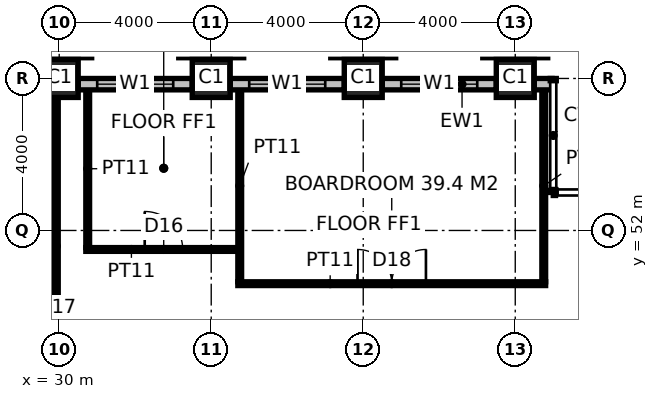
"""IFC4 building model, lengths in metres.
Left out: names, types, materials, properties, quantities, classifications, styles, units other than length and angle.
Written with IfcOpenShell. Run it as: python <this file> out.ifc"""

import sys

from ifc_helpers import new_model, si_unit, direction, frame, frame_2d, origin, origin_2d, place, context, subcontext, project, spatial, rectangle, hollow_rectangle, extrude, element, fill, save


model = new_model("IFC4")
c1 = context("Model", 3, precision=1e-05, world=origin(), true_north=direction((0.0, 1.0)))
c2 = subcontext(c1, "Body", "Model", "MODEL_VIEW")
j1 = project(units=[si_unit("LENGTHUNIT", "METRE"), si_unit("PLANEANGLEUNIT", "RADIAN")], contexts=[c1])
p1 = place(None, origin())
s1 = spatial("IfcSite", under=j1, at=p1, CompositionType="ELEMENT")
p2 = place(p1, origin())
s2 = spatial("IfcBuilding", under=s1, at=p2, CompositionType="ELEMENT")
p3 = place(p2, frame((0.0, 0.0, 187.8)))
s3 = spatial("IfcBuildingStorey", under=s2, at=p3, CompositionType="ELEMENT", Elevation=187.8)
for number, where, z_axis, x_axis in (
    (1, (30.0, 56.0, 0.0), (0.0, 0.0, 1.0), (1.0, 0.0, 0.0)),
    (2, (34.0, 56.0, 0.0), (0.0, 0.0, 1.0), (1.0, 0.0, 0.0)),
    (3, (38.0, 56.0, 0.0), (0.0, 0.0, 1.0), (1.0, 0.0, 0.0)),
    (4, (42.0, 56.0, 0.0), (0.0, 0.0, 1.0), (1.0, 0.0, 0.0)),
):
    element("IfcColumn", number, at=place(p3, frame(where, z_axis=z_axis, x_axis=x_axis)), inside=s3, PredefinedType="COLUMN", context=c2, shape_type="SweptSolid", body=[
        extrude(hollow_rectangle(XDim=1.0, YDim=1.0, WallThickness=0.1, at=origin_2d()), origin(), (0.0, 0.0, 1.0), 4.0),
    ])
p4 = place(p3, frame((34.7, 50.6, 0.0), z_axis=(0.0, 0.0, 1.0), x_axis=(1.0, 0.0, 0.0)))
e5 = element("IfcWall", 5, at=p4, inside=s3, PredefinedType="PARTITIONING", context=c2, shape_type="SweptSolid", body=[
    extrude(rectangle(XDim=8.1, YDim=0.1, at=frame_2d((4.05, 0.0))), origin(), (0.0, 0.0, 1.0), 3.85),
])
p5 = place(p4, frame((3.15, 0.0, 0.0)))
e6 = element("IfcOpeningElement", 6, at=p5, cuts=e5, PredefinedType="OPENING", context=c2, shape_type="SweptSolid", body=[
    extrude(rectangle(XDim=1.8, YDim=2.4, at=frame_2d((0.9, 1.2))), frame((0.0, 0.06, 0.0), z_axis=(0.0, -1.0, 0.0), x_axis=(1.0, 0.0, 0.0)), (0.0, 0.0, 1.0), 0.12),
])
p6 = place(p3, frame((30.7, 51.5, 0.0), z_axis=(0.0, 0.0, 1.0), x_axis=(1.0, 0.0, 0.0)))
e7 = element("IfcWall", 7, at=p6, inside=s3, PredefinedType="PARTITIONING", context=c2, shape_type="SweptSolid", body=[
    extrude(rectangle(XDim=4.0, YDim=0.1, at=frame_2d((2.0, 0.0))), origin(), (0.0, 0.0, 1.0), 3.85),
])
p7 = place(p6, frame((1.55, 0.0, 0.0)))
e8 = element("IfcOpeningElement", 8, at=p7, cuts=e7, PredefinedType="OPENING", context=c2, shape_type="SweptSolid", body=[
    extrude(rectangle(XDim=1.0, YDim=2.2, at=frame_2d((0.5, 1.1))), frame((0.0, 0.06, 0.0), z_axis=(0.0, -1.0, 0.0), x_axis=(1.0, 0.0, 0.0)), (0.0, 0.0, 1.0), 0.12),
])
p8 = place(p3, frame((30.75, 51.55, 0.0), z_axis=(0.0, 0.0, 1.0), x_axis=(0.0, 1.0, 0.0)))
e9 = element("IfcWall", 9, at=p8, inside=s3, PredefinedType="PARTITIONING", context=c2, shape_type="SweptSolid", body=[
    extrude(rectangle(XDim=4.15, YDim=0.1, at=frame_2d((2.075, 0.0))), origin(), (0.0, 0.0, 1.0), 3.85),
])
for number, where, z_axis, x_axis in (
    (10, (34.75, 50.65, 0.0), (0.0, 0.0, 1.0), (0.0, 1.0, 0.0)),
    (11, (42.75, 50.65, 0.0), (0.0, 0.0, 1.0), (0.0, 1.0, 0.0)),
):
    element("IfcWall", number, at=place(p3, frame(where, z_axis=z_axis, x_axis=x_axis)), inside=s3, PredefinedType="PARTITIONING", context=c2, shape_type="SweptSolid", body=[
        extrude(rectangle(XDim=5.05, YDim=0.1, at=frame_2d((2.525, 0.0))), origin(), (0.0, 0.0, 1.0), 3.85),
    ])
p9 = place(p3, frame((29.925, 55.7, 0.0), z_axis=(0.0, 0.0, 1.0), x_axis=(0.0, -1.0, 0.0)))
e12 = element("IfcWall", 12, at=p9, inside=s3, PredefinedType="PARTITIONING", context=c2, shape_type="SweptSolid", body=[
    extrude(rectangle(XDim=13.7, YDim=0.1, at=frame_2d((6.85, 0.0))), origin(), (0.0, 0.0, 1.0), 2.95),
])
p10 = place(p9, frame((6.35, 0.0, 0.0)))
e13 = element("IfcOpeningElement", 13, at=p10, cuts=e12, PredefinedType="OPENING", context=c2, shape_type="SweptSolid", body=[
    extrude(rectangle(XDim=1.0, YDim=2.2, at=frame_2d((0.5, 1.1))), frame((0.0, 0.06, 0.0), z_axis=(0.0, -1.0, 0.0), x_axis=(1.0, 0.0, 0.0)), (0.0, 0.0, 1.0), 0.12),
])
p11 = place(p3, frame((33.5, 55.85, 0.0), z_axis=(0.0, 0.0, 1.0), x_axis=(-1.0, 0.0, 0.0)))
e14 = element("IfcWall", 14, at=p11, inside=s3, PredefinedType="ELEMENTEDWALL", context=c2, shape_type="SweptSolid", body=[
    extrude(rectangle(XDim=3.0, YDim=0.3, at=frame_2d((1.5, 0.0))), origin(), (0.0, 0.0, 1.0), 2.85),
])
p12 = place(p11, frame((0.5, 0.0, 0.8)))
e15 = element("IfcOpeningElement", 15, at=p12, cuts=e14, PredefinedType="OPENING", context=c2, shape_type="SweptSolid", body=[
    extrude(rectangle(XDim=2.0, YDim=2.0, at=frame_2d((1.0, 1.0))), frame((0.0, 0.16, 0.0), z_axis=(0.0, -1.0, 0.0), x_axis=(1.0, 0.0, 0.0)), (0.0, 0.0, 1.0), 0.32),
])
p13 = place(p3, frame((37.5, 55.85, 0.0), z_axis=(0.0, 0.0, 1.0), x_axis=(-1.0, 0.0, 0.0)))
e16 = element("IfcWall", 16, at=p13, inside=s3, PredefinedType="ELEMENTEDWALL", context=c2, shape_type="SweptSolid", body=[
    extrude(rectangle(XDim=3.0, YDim=0.3, at=frame_2d((1.5, 0.0))), origin(), (0.0, 0.0, 1.0), 2.85),
])
p14 = place(p13, frame((0.5, 0.0, 0.8)))
e17 = element("IfcOpeningElement", 17, at=p14, cuts=e16, PredefinedType="OPENING", context=c2, shape_type="SweptSolid", body=[
    extrude(rectangle(XDim=2.0, YDim=2.0, at=frame_2d((1.0, 1.0))), frame((0.0, 0.16, 0.0), z_axis=(0.0, -1.0, 0.0), x_axis=(1.0, 0.0, 0.0)), (0.0, 0.0, 1.0), 0.32),
])
p15 = place(p3, frame((41.5, 55.85, 0.0), z_axis=(0.0, 0.0, 1.0), x_axis=(-1.0, 0.0, 0.0)))
e18 = element("IfcWall", 18, at=p15, inside=s3, PredefinedType="ELEMENTEDWALL", context=c2, shape_type="SweptSolid", body=[
    extrude(rectangle(XDim=3.0, YDim=0.3, at=frame_2d((1.5, 0.0))), origin(), (0.0, 0.0, 1.0), 2.85),
])
p16 = place(p15, frame((0.5, 0.0, 0.8)))
e19 = element("IfcOpeningElement", 19, at=p16, cuts=e18, PredefinedType="OPENING", context=c2, shape_type="SweptSolid", body=[
    extrude(rectangle(XDim=2.0, YDim=2.0, at=frame_2d((1.0, 1.0))), frame((0.0, 0.16, 0.0), z_axis=(0.0, -1.0, 0.0), x_axis=(1.0, 0.0, 0.0)), (0.0, 0.0, 1.0), 0.32),
])
p17 = place(p3, frame((42.97, 55.85, 0.0), z_axis=(0.0, 0.0, 1.0), x_axis=(-1.0, 0.0, 0.0)))
e20 = element("IfcWall", 20, at=p17, inside=s3, PredefinedType="ELEMENTEDWALL", context=c2, shape_type="SweptSolid", body=[
    extrude(rectangle(XDim=0.47, YDim=0.3, at=frame_2d((0.235, 0.0))), origin(), (0.0, 0.0, 1.0), 2.95),
])
p18 = place(p7, origin())
e21 = element("IfcDoor", 21, at=p18, inside=s3, OperationType="SINGLE_SWING_LEFT", PredefinedType="DOOR", context=c2, shape_type="SweptSolid", body=[
    extrude(rectangle(XDim=1.0, YDim=2.2, at=frame_2d((0.5, 1.1))), frame((0.0, 0.025, 0.0), z_axis=(0.0, -1.0, 0.0), x_axis=(1.0, 0.0, 0.0)), (0.0, 0.0, 1.0), 0.05),
])
fill(e8, e21)
p19 = place(p5, origin())
e22 = element("IfcDoor", 22, at=p19, inside=s3, OperationType="DOUBLE_DOOR_DOUBLE_SWING", PredefinedType="DOOR", context=c2, shape_type="SweptSolid", body=[
    extrude(rectangle(XDim=1.8, YDim=2.4, at=frame_2d((0.9, 1.2))), frame((0.0, 0.025, 0.0), z_axis=(0.0, -1.0, 0.0), x_axis=(1.0, 0.0, 0.0)), (0.0, 0.0, 1.0), 0.05),
])
fill(e6, e22)
p20 = place(p12, origin())
e23 = element("IfcWindow", 23, at=p20, inside=s3, PartitioningType="SINGLE_PANEL", PredefinedType="WINDOW", context=c2, shape_type="SweptSolid", body=[
    extrude(rectangle(XDim=2.0, YDim=2.0, at=frame_2d((1.0, 1.0))), frame((0.0, 0.03, 0.0), z_axis=(0.0, -1.0, 0.0), x_axis=(1.0, 0.0, 0.0)), (0.0, 0.0, 1.0), 0.06),
])
fill(e15, e23)
p21 = place(p14, origin())
e24 = element("IfcWindow", 24, at=p21, inside=s3, PartitioningType="SINGLE_PANEL", PredefinedType="WINDOW", context=c2, shape_type="SweptSolid", body=[
    extrude(rectangle(XDim=2.0, YDim=2.0, at=frame_2d((1.0, 1.0))), frame((0.0, 0.03, 0.0), z_axis=(0.0, -1.0, 0.0), x_axis=(1.0, 0.0, 0.0)), (0.0, 0.0, 1.0), 0.06),
])
fill(e17, e24)
p22 = place(p16, origin())
e25 = element("IfcWindow", 25, at=p22, inside=s3, PartitioningType="SINGLE_PANEL", PredefinedType="WINDOW", context=c2, shape_type="SweptSolid", body=[
    extrude(rectangle(XDim=2.0, YDim=2.0, at=frame_2d((1.0, 1.0))), frame((0.0, 0.03, 0.0), z_axis=(0.0, -1.0, 0.0), x_axis=(1.0, 0.0, 0.0)), (0.0, 0.0, 1.0), 0.06),
])
fill(e19, e25)
save(model, sys.argv[1])
